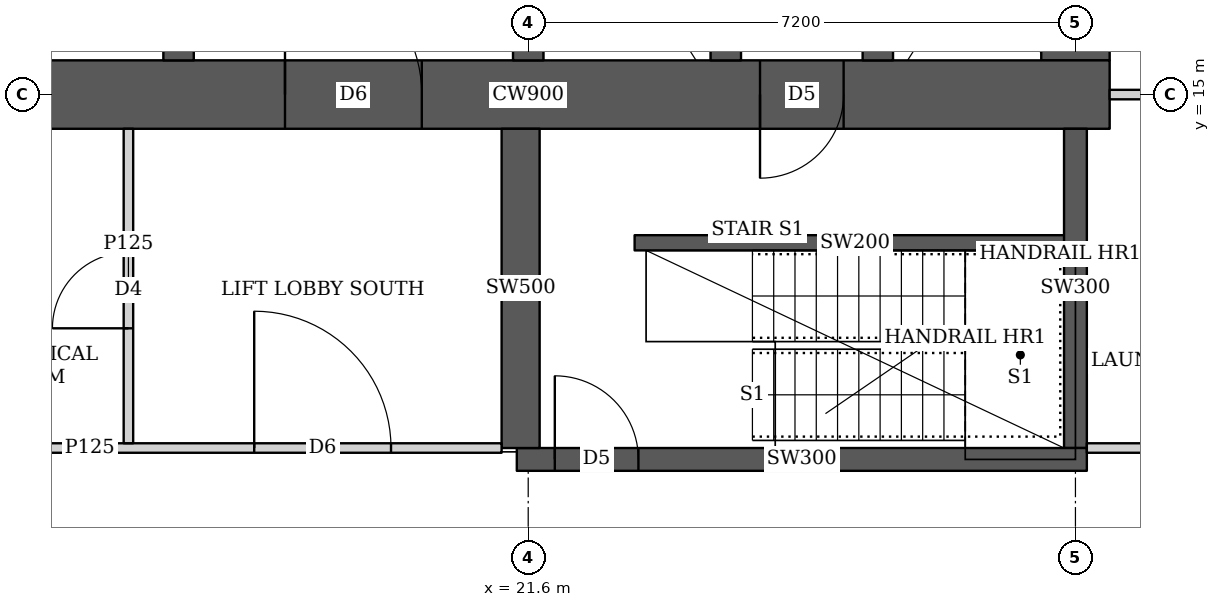
"""IFC4 building model, lengths in metres.
Left out: names, types, materials, properties, quantities, classifications, styles, units other than length and angle.
Written with IfcOpenShell. Run it as: python <this file> out.ifc"""

import sys

from ifc_helpers import new_model, si_unit, direction, frame, frame_2d, origin, place, context, subcontext, project, spatial, rectangle, extrude, element, fill, save


model = new_model("IFC4")
c1 = context("Model", 3, precision=1e-05, world=origin(), true_north=direction((0.0, 1.0)))
c2 = subcontext(c1, "Body", "Model", "MODEL_VIEW")
j1 = project(units=[si_unit("LENGTHUNIT", "METRE"), si_unit("PLANEANGLEUNIT", "RADIAN")], contexts=[c1])
p1 = place(None, origin())
s1 = spatial("IfcSite", under=j1, at=p1, CompositionType="ELEMENT")
p2 = place(p1, origin())
s2 = spatial("IfcBuilding", under=s1, at=p2, CompositionType="ELEMENT")
p3 = place(p2, frame((0.0, 0.0, 135.8)))
s3 = spatial("IfcBuildingStorey", under=s2, at=p3, CompositionType="ELEMENT", Elevation=135.8)
p4 = place(p3, frame((13.95, 15.0, 0.0), z_axis=(0.0, 0.0, 1.0), x_axis=(1.0, 0.0, 0.0)))
e1 = element("IfcWall", 1, at=p4, inside=s3, PredefinedType="SHEAR", context=c2, shape_type="SweptSolid", body=[
    extrude(rectangle(XDim=15.3, YDim=0.9, at=frame_2d((7.65, 0.0))), origin(), (0.0, 0.0, 1.0), 3.75),
])
p5 = place(p4, frame((4.45, 0.0, 0.0)))
e2 = element("IfcOpeningElement", 2, at=p5, cuts=e1, PredefinedType="OPENING", context=c2, shape_type="SweptSolid", body=[
    extrude(rectangle(XDim=1.8, YDim=2.1, at=frame_2d((0.9, 1.05))), frame((0.0, 0.46, 0.0), z_axis=(0.0, -1.0, 0.0), x_axis=(1.0, 0.0, 0.0)), (0.0, 0.0, 1.0), 0.92),
])
p6 = place(p4, frame((10.7, 0.0, 0.0)))
e3 = element("IfcOpeningElement", 3, at=p6, cuts=e1, PredefinedType="OPENING", context=c2, shape_type="SweptSolid", body=[
    extrude(rectangle(XDim=1.1, YDim=2.1, at=frame_2d((0.55, 1.05))), frame((0.0, 0.46, 0.0), z_axis=(0.0, -1.0, 0.0), x_axis=(1.0, 0.0, 0.0)), (0.0, 0.0, 1.0), 0.92),
])
p7 = place(p3, frame((28.8, 15.45, 0.0), z_axis=(0.0, 0.0, 1.0), x_axis=(0.0, 1.0, 0.0)))
e4 = element("IfcWall", 4, at=p7, inside=s3, PredefinedType="SHEAR", context=c2, shape_type="SweptSolid", body=[
    extrude(rectangle(XDim=14.1, YDim=0.9, at=frame_2d((7.05, 0.0))), origin(), (0.0, 0.0, 1.0), 3.75),
])
p8 = place(p3, frame((17.0, 15.45, 0.0), z_axis=(0.0, 0.0, 1.0), x_axis=(0.0, 1.0, 0.0)))
e5 = element("IfcWall", 5, at=p8, inside=s3, PredefinedType="SHEAR", context=c2, shape_type="SweptSolid", body=[
    extrude(rectangle(XDim=14.1, YDim=0.4, at=frame_2d((7.05, 0.0))), origin(), (0.0, 0.0, 1.0), 3.75),
])
p9 = place(p8, frame((0.925, 0.0, 0.0)))
e6 = element("IfcOpeningElement", 6, at=p9, cuts=e5, PredefinedType="OPENING", context=c2, shape_type="SweptSolid", body=[
    extrude(rectangle(XDim=1.0, YDim=2.1, at=frame_2d((0.5, 1.05))), frame((0.0, 0.21, 0.0), z_axis=(0.0, -1.0, 0.0), x_axis=(1.0, 0.0, 0.0)), (0.0, 0.0, 1.0), 0.42),
])
p10 = place(p8, frame((4.675, 0.0, 0.0)))
e7 = element("IfcOpeningElement", 7, at=p10, cuts=e5, PredefinedType="OPENING", context=c2, shape_type="SweptSolid", body=[
    extrude(rectangle(XDim=1.0, YDim=2.1, at=frame_2d((0.5, 1.05))), frame((0.0, 0.21, 0.0), z_axis=(0.0, -1.0, 0.0), x_axis=(1.0, 0.0, 0.0)), (0.0, 0.0, 1.0), 0.42),
])
p11 = place(p8, frame((8.425, 0.0, 0.0)))
e8 = element("IfcOpeningElement", 8, at=p11, cuts=e5, PredefinedType="OPENING", context=c2, shape_type="SweptSolid", body=[
    extrude(rectangle(XDim=1.0, YDim=2.1, at=frame_2d((0.5, 1.05))), frame((0.0, 0.21, 0.0), z_axis=(0.0, -1.0, 0.0), x_axis=(1.0, 0.0, 0.0)), (0.0, 0.0, 1.0), 0.42),
])
p12 = place(p8, frame((12.175, 0.0, 0.0)))
e9 = element("IfcOpeningElement", 9, at=p12, cuts=e5, PredefinedType="OPENING", context=c2, shape_type="SweptSolid", body=[
    extrude(rectangle(XDim=1.0, YDim=2.1, at=frame_2d((0.5, 1.05))), frame((0.0, 0.21, 0.0), z_axis=(0.0, -1.0, 0.0), x_axis=(1.0, 0.0, 0.0)), (0.0, 0.0, 1.0), 0.42),
])
p13 = place(p3, frame((21.6, 15.45, 0.0), z_axis=(0.0, 0.0, 1.0), x_axis=(0.0, 1.0, 0.0)))
e10 = element("IfcWall", 10, at=p13, inside=s3, PredefinedType="SHEAR", context=c2, shape_type="SweptSolid", body=[
    extrude(rectangle(XDim=14.1, YDim=0.4, at=frame_2d((7.05, 0.0))), origin(), (0.0, 0.0, 1.0), 3.75),
])
p14 = place(p13, frame((0.875, 0.0, 0.0)))
e11 = element("IfcOpeningElement", 11, at=p14, cuts=e10, PredefinedType="OPENING", context=c2, shape_type="SweptSolid", body=[
    extrude(rectangle(XDim=1.1, YDim=2.1, at=frame_2d((0.55, 1.05))), frame((0.0, 0.21, 0.0), z_axis=(0.0, -1.0, 0.0), x_axis=(1.0, 0.0, 0.0)), (0.0, 0.0, 1.0), 0.42),
])
p15 = place(p13, frame((4.625, 0.0, 0.0)))
e12 = element("IfcOpeningElement", 12, at=p15, cuts=e10, PredefinedType="OPENING", context=c2, shape_type="SweptSolid", body=[
    extrude(rectangle(XDim=1.1, YDim=2.1, at=frame_2d((0.55, 1.05))), frame((0.0, 0.21, 0.0), z_axis=(0.0, -1.0, 0.0), x_axis=(1.0, 0.0, 0.0)), (0.0, 0.0, 1.0), 0.42),
])
p16 = place(p13, frame((8.375, 0.0, 0.0)))
e13 = element("IfcOpeningElement", 13, at=p16, cuts=e10, PredefinedType="OPENING", context=c2, shape_type="SweptSolid", body=[
    extrude(rectangle(XDim=1.1, YDim=2.1, at=frame_2d((0.55, 1.05))), frame((0.0, 0.21, 0.0), z_axis=(0.0, -1.0, 0.0), x_axis=(1.0, 0.0, 0.0)), (0.0, 0.0, 1.0), 0.42),
])
p17 = place(p13, frame((12.125, 0.0, 0.0)))
e14 = element("IfcOpeningElement", 14, at=p17, cuts=e10, PredefinedType="OPENING", context=c2, shape_type="SweptSolid", body=[
    extrude(rectangle(XDim=1.1, YDim=2.1, at=frame_2d((0.55, 1.05))), frame((0.0, 0.21, 0.0), z_axis=(0.0, -1.0, 0.0), x_axis=(1.0, 0.0, 0.0)), (0.0, 0.0, 1.0), 0.42),
])
p18 = place(p3, frame((24.2, 15.45, 0.0), z_axis=(0.0, 0.0, 1.0), x_axis=(0.0, 1.0, 0.0)))
e15 = element("IfcWall", 15, at=p18, inside=s3, PredefinedType="SHEAR", context=c2, shape_type="SweptSolid", body=[
    extrude(rectangle(XDim=14.1, YDim=0.4, at=frame_2d((7.05, 0.0))), origin(), (0.0, 0.0, 1.0), 3.75),
])
p19 = place(p3, frame((26.2, 15.45, 0.0), z_axis=(0.0, 0.0, 1.0), x_axis=(0.0, 1.0, 0.0)))
e16 = element("IfcWall", 16, at=p19, inside=s3, PredefinedType="SHEAR", context=c2, shape_type="SweptSolid", body=[
    extrude(rectangle(XDim=3.1, YDim=0.4, at=frame_2d((1.55, 0.0))), origin(), (0.0, 0.0, 1.0), 3.75),
])
p20 = place(p19, frame((0.825, 0.0, 0.0)))
e17 = element("IfcOpeningElement", 17, at=p20, cuts=e16, PredefinedType="OPENING", context=c2, shape_type="SweptSolid", body=[
    extrude(rectangle(XDim=1.2, YDim=2.1, at=frame_2d((0.6, 1.05))), frame((0.0, 0.21, 0.0), z_axis=(0.0, -1.0, 0.0), x_axis=(1.0, 0.0, 0.0)), (0.0, 0.0, 1.0), 0.42),
])
p21 = place(p3, frame((21.45, 10.2, 0.0), z_axis=(0.0, 0.0, 1.0), x_axis=(1.0, 0.0, 0.0)))
e18 = element("IfcWall", 18, at=p21, inside=s3, PredefinedType="SHEAR", context=c2, shape_type="SweptSolid", body=[
    extrude(rectangle(XDim=7.5, YDim=0.3, at=frame_2d((3.75, 0.0))), origin(), (0.0, 0.0, 1.0), 3.75),
])
p22 = place(p21, frame((0.5, 0.0, 0.0)))
e19 = element("IfcOpeningElement", 19, at=p22, cuts=e18, PredefinedType="OPENING", context=c2, shape_type="SweptSolid", body=[
    extrude(rectangle(XDim=1.1, YDim=2.1, at=frame_2d((0.55, 1.05))), frame((0.0, 0.16, 0.0), z_axis=(0.0, -1.0, 0.0), x_axis=(1.0, 0.0, 0.0)), (0.0, 0.0, 1.0), 0.32),
])
p23 = place(p3, frame((21.5, 10.35, 0.0), z_axis=(0.0, 0.0, 1.0), x_axis=(0.0, 1.0, 0.0)))
e20 = element("IfcWall", 20, at=p23, inside=s3, PredefinedType="SHEAR", context=c2, shape_type="SweptSolid", body=[
    extrude(rectangle(XDim=4.2, YDim=0.5, at=frame_2d((2.1, 0.0))), origin(), (0.0, 0.0, 1.0), 3.75),
])
p24 = place(p3, frame((28.8, 10.35, 0.0), z_axis=(0.0, 0.0, 1.0), x_axis=(0.0, 1.0, 0.0)))
e21 = element("IfcWall", 21, at=p24, inside=s3, PredefinedType="SHEAR", context=c2, shape_type="SweptSolid", body=[
    extrude(rectangle(XDim=4.2, YDim=0.3, at=frame_2d((2.1, 0.0))), origin(), (0.0, 0.0, 1.0), 3.75),
])
p25 = place(p3, frame((10.413, 10.35, 0.0), z_axis=(0.0, 0.0, 1.0), x_axis=(1.0, 0.0, 0.0)))
e22 = element("IfcWall", 22, at=p25, inside=s3, PredefinedType="PARTITIONING", context=c2, shape_type="SweptSolid", body=[
    extrude(rectangle(XDim=10.837, YDim=0.125, at=frame_2d((5.418, 0.0))), origin(), (0.0, 0.0, 1.0), 3.5),
])
p26 = place(p25, frame((7.582, 0.0, 0.0)))
e23 = element("IfcOpeningElement", 23, at=p26, cuts=e22, PredefinedType="OPENING", context=c2, shape_type="SweptSolid", body=[
    extrude(rectangle(XDim=1.8, YDim=2.1, at=frame_2d((0.9, 1.05))), frame((0.0, 0.073, 0.0), z_axis=(0.0, -1.0, 0.0), x_axis=(1.0, 0.0, 0.0)), (0.0, 0.0, 1.0), 0.145),
])
p27 = place(p3, frame((16.34, 10.413, 0.0), z_axis=(0.0, 0.0, 1.0), x_axis=(0.0, 1.0, 0.0)))
e24 = element("IfcWall", 24, at=p27, inside=s3, PredefinedType="PARTITIONING", context=c2, shape_type="SweptSolid", body=[
    extrude(rectangle(XDim=4.137, YDim=0.125, at=frame_2d((2.068, 0.0))), origin(), (0.0, 0.0, 1.0), 3.5),
])
p28 = place(p27, frame((1.512, 0.0, 0.0)))
e25 = element("IfcOpeningElement", 25, at=p28, cuts=e24, PredefinedType="OPENING", context=c2, shape_type="SweptSolid", body=[
    extrude(rectangle(XDim=1.0, YDim=2.1, at=frame_2d((0.5, 1.05))), frame((0.0, 0.073, 0.0), z_axis=(0.0, -1.0, 0.0), x_axis=(1.0, 0.0, 0.0)), (0.0, 0.0, 1.0), 0.145),
])
p29 = place(p3, frame((28.95, 10.35, 0.0), z_axis=(0.0, 0.0, 1.0), x_axis=(1.0, 0.0, 0.0)))
e26 = element("IfcWall", 26, at=p29, inside=s3, PredefinedType="PARTITIONING", context=c2, shape_type="SweptSolid", body=[
    extrude(rectangle(XDim=9.013, YDim=0.125, at=frame_2d((4.506, 0.0))), origin(), (0.0, 0.0, 1.0), 3.5),
])
p30 = place(p3, frame((29.25, 15.0, 0.0), z_axis=(0.0, 0.0, 1.0), x_axis=(1.0, 0.0, 0.0)))
e27 = element("IfcWall", 27, at=p30, inside=s3, PredefinedType="PARTITIONING", context=c2, shape_type="SweptSolid", body=[
    extrude(rectangle(XDim=5.176, YDim=0.125, at=frame_2d((2.588, 0.0))), origin(), (0.0, 0.0, 1.0), 3.5),
])
p31 = place(p3, frame((23.0, 13.05, 0.0), z_axis=(0.0, 0.0, 1.0), x_axis=(1.0, 0.0, 0.0)))
e28 = element("IfcWall", 28, at=p31, inside=s3, PredefinedType="SHEAR", context=c2, shape_type="SweptSolid", body=[
    extrude(rectangle(XDim=5.8, YDim=0.2, at=frame_2d((2.9, 0.0))), origin(), (0.0, 0.0, 1.0), 3.75),
])
p32 = place(p28, origin())
e29 = element("IfcDoor", 29, at=p32, inside=s3, OperationType="SINGLE_SWING_LEFT", PredefinedType="DOOR", context=c2, shape_type="SweptSolid", body=[
    extrude(rectangle(XDim=1.0, YDim=2.1, at=frame_2d((0.5, 1.05))), frame((0.0, 0.025, 0.0), z_axis=(0.0, -1.0, 0.0), x_axis=(1.0, 0.0, 0.0)), (0.0, 0.0, 1.0), 0.05),
])
fill(e25, e29)
p33 = place(p26, origin())
e30 = element("IfcDoor", 30, at=p33, inside=s3, OperationType="DOUBLE_DOOR_SINGLE_SWING", PredefinedType="DOOR", context=c2, shape_type="SweptSolid", body=[
    extrude(rectangle(XDim=1.8, YDim=2.1, at=frame_2d((0.9, 1.05))), frame((0.0, 0.025, 0.0), z_axis=(0.0, -1.0, 0.0), x_axis=(1.0, 0.0, 0.0)), (0.0, 0.0, 1.0), 0.05),
])
fill(e23, e30)
p34 = place(p5, origin())
e31 = element("IfcDoor", 31, at=p34, inside=s3, OperationType="DOUBLE_DOOR_SINGLE_SWING", PredefinedType="DOOR", context=c2, shape_type="SweptSolid", body=[
    extrude(rectangle(XDim=1.8, YDim=2.1, at=frame_2d((0.9, 1.05))), frame((0.0, 0.025, 0.0), z_axis=(0.0, -1.0, 0.0), x_axis=(1.0, 0.0, 0.0)), (0.0, 0.0, 1.0), 0.05),
])
fill(e2, e31)
p35 = place(p6, origin())
e32 = element("IfcDoor", 32, at=p35, inside=s3, OperationType="SINGLE_SWING_RIGHT", PredefinedType="DOOR", context=c2, shape_type="SweptSolid", body=[
    extrude(rectangle(XDim=1.1, YDim=2.1, at=frame_2d((0.55, 1.05))), frame((0.0, 0.025, 0.0), z_axis=(0.0, -1.0, 0.0), x_axis=(1.0, 0.0, 0.0)), (0.0, 0.0, 1.0), 0.05),
])
fill(e3, e32)
p36 = place(p22, origin())
e33 = element("IfcDoor", 33, at=p36, inside=s3, OperationType="SINGLE_SWING_LEFT", PredefinedType="DOOR", context=c2, shape_type="SweptSolid", body=[
    extrude(rectangle(XDim=1.1, YDim=2.1, at=frame_2d((0.55, 1.05))), frame((0.0, 0.025, 0.0), z_axis=(0.0, -1.0, 0.0), x_axis=(1.0, 0.0, 0.0)), (0.0, 0.0, 1.0), 0.05),
])
fill(e19, e33)
save(model, sys.argv[1])
